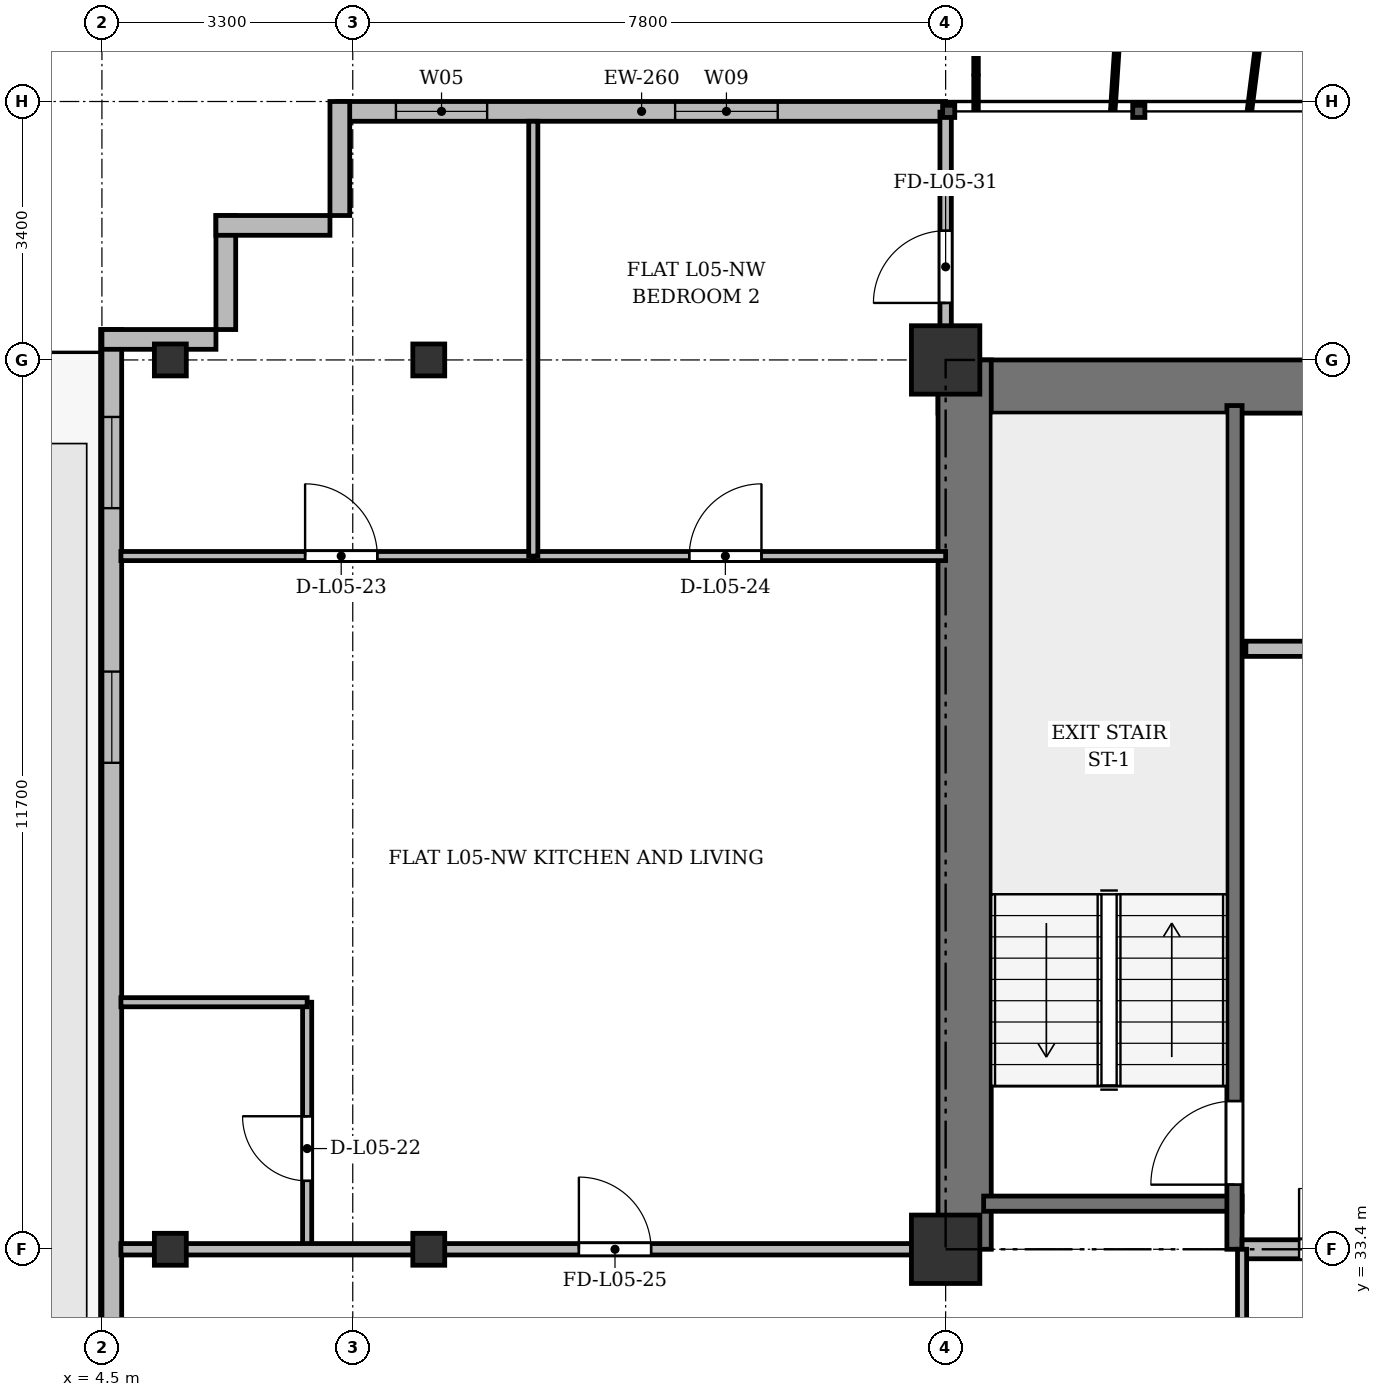
"""IFC4 building model, lengths in metres.
Left out: names, types, materials, properties, quantities, classifications, styles, units other than length and angle.
Written with IfcOpenShell. Run it as: python <this file> out.ifc"""

import sys

from ifc_helpers import new_model, si_unit, direction, frame, frame_2d, origin, origin_2d, place, context, subcontext, project, spatial, rectangle, i_section, extrude, source, transform, mapped, element, fill, save


model = new_model("IFC4")
c1 = context("Model", 3, precision=1e-05, world=origin(), true_north=direction((0.0, 1.0)))
c2 = subcontext(c1, "Body", "Model", "MODEL_VIEW")
j1 = project(units=[si_unit("LENGTHUNIT", "METRE"), si_unit("PLANEANGLEUNIT", "RADIAN")], contexts=[c1])
p1 = place(None, origin())
s1 = spatial("IfcSite", under=j1, at=p1, CompositionType="ELEMENT")
p2 = place(p1, origin())
s2 = spatial("IfcBuilding", under=s1, at=p2, CompositionType="ELEMENT")
p3 = place(p2, frame((0.0, 0.0, 23.5)))
s3 = spatial("IfcBuildingStorey", under=s2, at=p3, CompositionType="ELEMENT", Elevation=23.5)
m1 = source(origin(), c2, "Body", "SweptSolid", [
    extrude(i_section(OverallWidth=0.42, OverallDepth=0.42, WebThickness=0.026, FlangeThickness=0.04, at=origin_2d()), origin(), (0.0, 0.0, 1.0), 3.6),
])
for number, where, z_axis, x_axis in (
    (1, (5.4, 33.4, 0.0), (0.0, 0.0, 1.0), (1.0, 0.0, 0.0)),
    (2, (5.4, 45.1, 0.0), (0.0, 0.0, 1.0), (1.0, 0.0, 0.0)),
    (3, (8.8, 33.4, 0.0), (0.0, 0.0, 1.0), (1.0, 0.0, 0.0)),
    (4, (8.8, 45.1, 0.0), (0.0, 0.0, 1.0), (1.0, 0.0, 0.0)),
):
    element("IfcColumn", number, at=place(p3, frame(where, z_axis=z_axis, x_axis=x_axis)), inside=s3, PredefinedType="COLUMN", context=c2, shape_type="MappedRepresentation", body=[
        mapped(m1, transform((0.0, 0.0, 0.0), x_axis=(1.0, 0.0, 0.0), y_axis=(0.0, 1.0, 0.0), z_axis=(0.0, 0.0, 1.0), scale=1.0)),
    ])
m2 = source(origin(), c2, "Body", "SweptSolid", [
    extrude(rectangle(XDim=0.9, YDim=0.9, at=origin_2d()), origin(), (0.0, 0.0, 1.0), 3.6),
])
for number, where, z_axis, x_axis in (
    (5, (15.6, 33.4, 0.0), (0.0, 0.0, 1.0), (1.0, 0.0, 0.0)),
    (6, (15.6, 45.1, 0.0), (0.0, 0.0, 1.0), (1.0, 0.0, 0.0)),
):
    element("IfcColumn", number, at=place(p3, frame(where, z_axis=z_axis, x_axis=x_axis)), inside=s3, PredefinedType="COLUMN", context=c2, shape_type="MappedRepresentation", body=[
        mapped(m2, transform((0.0, 0.0, 0.0), x_axis=(1.0, 0.0, 0.0), y_axis=(0.0, 1.0, 0.0), z_axis=(0.0, 0.0, 1.0), scale=1.0)),
    ])
p4 = place(p3, frame((7.6, 48.37, 0.0), z_axis=(0.0, 0.0, 1.0), x_axis=(1.0, 0.0, 0.0)))
e7 = element("IfcWall", 7, at=p4, inside=s3, PredefinedType="SOLIDWALL", context=c2, shape_type="SweptSolid", body=[
    extrude(rectangle(XDim=8.0, YDim=0.26, at=frame_2d((4.0, 0.0))), origin(), (0.0, 0.0, 1.0), 3.34),
])
p5 = place(p4, frame((0.768, 0.0, 0.9)))
e8 = element("IfcOpeningElement", 8, at=p5, cuts=e7, PredefinedType="OPENING", context=c2, shape_type="SweptSolid", body=[
    extrude(rectangle(XDim=1.2, YDim=1.65, at=frame_2d((0.6, 0.825))), frame((0.0, 0.14, 0.0), z_axis=(0.0, -1.0, 0.0), x_axis=(1.0, 0.0, 0.0)), (0.0, 0.0, 1.0), 0.28),
])
p6 = place(p4, frame((4.441, 0.0, 0.9)))
e9 = element("IfcOpeningElement", 9, at=p6, cuts=e7, PredefinedType="OPENING", context=c2, shape_type="SweptSolid", body=[
    extrude(rectangle(XDim=1.35, YDim=1.5, at=frame_2d((0.675, 0.75))), frame((0.0, 0.14, 0.0), z_axis=(0.0, -1.0, 0.0), x_axis=(1.0, 0.0, 0.0)), (0.0, 0.0, 1.0), 0.28),
])
p7 = place(p3, frame((4.63, 5.9, 0.0), z_axis=(0.0, 0.0, 1.0), x_axis=(0.0, 1.0, 0.0)))
e10 = element("IfcWall", 10, at=p7, inside=s3, PredefinedType="SOLIDWALL", context=c2, shape_type="SweptSolid", body=[
    extrude(rectangle(XDim=39.6, YDim=0.26, at=frame_2d((19.8, 0.0))), origin(), (0.0, 0.0, 1.0), 3.34),
])
p8 = place(p7, frame((9.745, 0.0, 0.0)))
e11 = element("IfcOpeningElement", 11, at=p8, cuts=e10, PredefinedType="OPENING", context=c2, shape_type="SweptSolid", body=[
    extrude(rectangle(XDim=1.2, YDim=2.2, at=frame_2d((0.6, 1.1))), frame((0.0, 0.14, 0.0), z_axis=(0.0, -1.0, 0.0), x_axis=(1.0, 0.0, 0.0)), (0.0, 0.0, 1.0), 0.28),
])
p9 = place(p7, frame((1.45, 0.0, 0.92)))
e12 = element("IfcOpeningElement", 12, at=p9, cuts=e10, PredefinedType="OPENING", context=c2, shape_type="SweptSolid", body=[
    extrude(rectangle(XDim=1.2, YDim=1.65, at=frame_2d((0.6, 0.825))), frame((0.0, 0.14, 0.0), z_axis=(0.0, -1.0, 0.0), x_axis=(1.0, 0.0, 0.0)), (0.0, 0.0, 1.0), 0.28),
])
p10 = place(p7, frame((4.3, 0.0, 0.92)))
e13 = element("IfcOpeningElement", 13, at=p10, cuts=e10, PredefinedType="OPENING", context=c2, shape_type="SweptSolid", body=[
    extrude(rectangle(XDim=2.4, YDim=2.1, at=frame_2d((1.2, 1.05))), frame((0.0, 0.14, 0.0), z_axis=(0.0, -1.0, 0.0), x_axis=(1.0, 0.0, 0.0)), (0.0, 0.0, 1.0), 0.28),
])
p11 = place(p7, frame((33.9, 0.0, 0.92)))
e14 = element("IfcOpeningElement", 14, at=p11, cuts=e10, PredefinedType="OPENING", context=c2, shape_type="SweptSolid", body=[
    extrude(rectangle(XDim=1.2, YDim=1.65, at=frame_2d((0.6, 0.825))), frame((0.0, 0.14, 0.0), z_axis=(0.0, -1.0, 0.0), x_axis=(1.0, 0.0, 0.0)), (0.0, 0.0, 1.0), 0.28),
])
p12 = place(p7, frame((37.25, 0.0, 0.92)))
e15 = element("IfcOpeningElement", 15, at=p12, cuts=e10, PredefinedType="OPENING", context=c2, shape_type="SweptSolid", body=[
    extrude(rectangle(XDim=1.2, YDim=1.65, at=frame_2d((0.6, 0.825))), frame((0.0, 0.14, 0.0), z_axis=(0.0, -1.0, 0.0), x_axis=(1.0, 0.0, 0.0)), (0.0, 0.0, 1.0), 0.28),
])
p13 = place(p3, frame((4.5, 45.37, 0.0), z_axis=(0.0, 0.0, 1.0), x_axis=(1.0, 0.0, 0.0)))
e16 = element("IfcWall", 16, at=p13, inside=s3, PredefinedType="SOLIDWALL", context=c2, shape_type="SweptSolid", body=[
    extrude(rectangle(XDim=1.5, YDim=0.26, at=frame_2d((0.75, 0.0))), origin(), (0.0, 0.0, 1.0), 2.69),
])
for number, where, z_axis, x_axis in (
    (17, (6.13, 45.5, 0.0), (0.0, 0.0, 1.0), (0.0, 1.0, 0.0)),
    (18, (6.0, 46.87, 0.0), (0.0, 0.0, 1.0), (1.0, 0.0, 0.0)),
    (19, (7.63, 47.0, 0.0), (0.0, 0.0, 1.0), (0.0, 1.0, 0.0)),
):
    element("IfcWall", number, at=place(p3, frame(where, z_axis=z_axis, x_axis=x_axis)), inside=s3, PredefinedType="SOLIDWALL", context=c2, shape_type="SweptSolid", body=[
        extrude(rectangle(XDim=1.5, YDim=0.26, at=frame_2d((0.75, 0.0))), origin(), (0.0, 0.0, 1.0), 3.34),
    ])
p14 = place(p3, frame((15.5, 44.75, 0.0), z_axis=(0.0, 0.0, 1.0), x_axis=(1.0, 0.0, 0.0)))
e20 = element("IfcWall", 20, at=p14, inside=s3, PredefinedType="SHEAR", context=c2, shape_type="SweptSolid", body=[
    extrude(rectangle(XDim=43.4, YDim=0.7, at=frame_2d((21.7, 0.0))), origin(), (0.0, 0.0, 1.0), 3.34),
])
p15 = place(p3, frame((15.85, 33.4, 0.0), z_axis=(0.0, 0.0, 1.0), x_axis=(0.0, 1.0, 0.0)))
e21 = element("IfcWall", 21, at=p15, inside=s3, PredefinedType="SHEAR", context=c2, shape_type="SweptSolid", body=[
    extrude(rectangle(XDim=11.7, YDim=0.7, at=frame_2d((5.85, 0.0))), origin(), (0.0, 0.0, 1.0), 3.34),
])
p16 = place(p3, frame((16.1, 34.0, 0.0), z_axis=(0.0, 0.0, 1.0), x_axis=(1.0, 0.0, 0.0)))
e22 = element("IfcWall", 22, at=p16, inside=s3, PredefinedType="SHEAR", context=c2, shape_type="SweptSolid", body=[
    extrude(rectangle(XDim=3.4, YDim=0.2, at=frame_2d((1.7, 0.0))), origin(), (0.0, 0.0, 1.0), 3.34),
])
p17 = place(p3, frame((19.4, 33.4, 0.0), z_axis=(0.0, 0.0, 1.0), x_axis=(0.0, 1.0, 0.0)))
e23 = element("IfcWall", 23, at=p17, inside=s3, PredefinedType="SHEAR", context=c2, shape_type="SweptSolid", body=[
    extrude(rectangle(XDim=11.1, YDim=0.2, at=frame_2d((5.55, 0.0))), origin(), (0.0, 0.0, 1.0), 3.34),
])
p18 = place(p17, frame((0.85, 0.0, 0.0)))
e24 = element("IfcOpeningElement", 24, at=p18, cuts=e23, PredefinedType="OPENING", context=c2, shape_type="SweptSolid", body=[
    extrude(rectangle(XDim=1.1, YDim=2.15, at=frame_2d((0.55, 1.075))), frame((0.0, 0.11, 0.0), z_axis=(0.0, -1.0, 0.0), x_axis=(1.0, 0.0, 0.0)), (0.0, 0.0, 1.0), 0.22),
])
p19 = place(p3, frame((19.55, 41.3, 0.0), z_axis=(0.0, 0.0, 1.0), x_axis=(1.0, 0.0, 0.0)))
e25 = element("IfcWall", 25, at=p19, inside=s3, PredefinedType="SOLIDWALL", context=c2, shape_type="SweptSolid", body=[
    extrude(rectangle(XDim=6.75, YDim=0.2, at=frame_2d((3.375, 0.0))), origin(), (0.0, 0.0, 1.0), 3.34),
])
p20 = place(p19, frame((1.7, 0.0, 0.0)))
e26 = element("IfcOpeningElement", 26, at=p20, cuts=e25, PredefinedType="OPENING", context=c2, shape_type="SweptSolid", body=[
    extrude(rectangle(XDim=1.1, YDim=2.15, at=frame_2d((0.55, 1.075))), frame((0.0, 0.11, 0.0), z_axis=(0.0, -1.0, 0.0), x_axis=(1.0, 0.0, 0.0)), (0.0, 0.0, 1.0), 0.22),
])
p21 = place(p19, frame((4.4, 0.0, 0.0)))
e27 = element("IfcOpeningElement", 27, at=p21, cuts=e25, PredefinedType="OPENING", context=c2, shape_type="SweptSolid", body=[
    extrude(rectangle(XDim=1.1, YDim=2.15, at=frame_2d((0.55, 1.075))), frame((0.0, 0.11, 0.0), z_axis=(0.0, -1.0, 0.0), x_axis=(1.0, 0.0, 0.0)), (0.0, 0.0, 1.0), 0.22),
])
p22 = place(p3, frame((19.5, 33.4, 0.0), z_axis=(0.0, 0.0, 1.0), x_axis=(1.0, 0.0, 0.0)))
e28 = element("IfcWall", 28, at=p22, inside=s3, PredefinedType="PARTITIONING", context=c2, shape_type="SweptSolid", body=[
    extrude(rectangle(XDim=6.8, YDim=0.25, at=frame_2d((3.4, 0.0))), origin(), (0.0, 0.0, 1.0), 2.69),
])
p23 = place(p22, frame((0.75, 0.0, 0.0)))
e29 = element("IfcOpeningElement", 29, at=p23, cuts=e28, PredefinedType="OPENING", context=c2, shape_type="SweptSolid", body=[
    extrude(rectangle(XDim=1.6, YDim=2.2, at=frame_2d((0.8, 1.1))), frame((0.0, 0.135, 0.0), z_axis=(0.0, -1.0, 0.0), x_axis=(1.0, 0.0, 0.0)), (0.0, 0.0, 1.0), 0.27),
])
p24 = place(p3, frame((19.5, 29.8, 0.0), z_axis=(0.0, 0.0, 1.0), x_axis=(0.0, 1.0, 0.0)))
e30 = element("IfcWall", 30, at=p24, inside=s3, PredefinedType="PARTITIONING", context=c2, shape_type="SweptSolid", body=[
    extrude(rectangle(XDim=3.6, YDim=0.12, at=frame_2d((1.8, 0.0))), origin(), (0.0, 0.0, 1.0), 2.69),
])
p25 = place(p3, frame((7.2, 33.4, 0.0), z_axis=(0.0, 0.0, 1.0), x_axis=(0.0, 1.0, 0.0)))
e31 = element("IfcWall", 31, at=p25, inside=s3, PredefinedType="PARTITIONING", context=c2, shape_type="SweptSolid", body=[
    extrude(rectangle(XDim=3.25, YDim=0.12, at=frame_2d((1.625, 0.0))), origin(), (0.0, 0.0, 1.0), 2.69),
])
p26 = place(p25, frame((0.9, 0.0, 0.0)))
e32 = element("IfcOpeningElement", 32, at=p26, cuts=e31, PredefinedType="OPENING", context=c2, shape_type="SweptSolid", body=[
    extrude(rectangle(XDim=0.85, YDim=2.1, at=frame_2d((0.425, 1.05))), frame((0.0, 0.07, 0.0), z_axis=(0.0, -1.0, 0.0), x_axis=(1.0, 0.0, 0.0)), (0.0, 0.0, 1.0), 0.14),
])
p27 = place(p3, frame((4.75, 36.65, 0.0), z_axis=(0.0, 0.0, 1.0), x_axis=(1.0, 0.0, 0.0)))
e33 = element("IfcWall", 33, at=p27, inside=s3, PredefinedType="PARTITIONING", context=c2, shape_type="SweptSolid", body=[
    extrude(rectangle(XDim=2.45, YDim=0.12, at=frame_2d((1.225, 0.0))), origin(), (0.0, 0.0, 1.0), 2.752),
])
p28 = place(p3, frame((4.75, 42.52, 0.0), z_axis=(0.0, 0.0, 1.0), x_axis=(1.0, 0.0, 0.0)))
e34 = element("IfcWall", 34, at=p28, inside=s3, PredefinedType="PARTITIONING", context=c2, shape_type="SweptSolid", body=[
    extrude(rectangle(XDim=5.425, YDim=0.12, at=frame_2d((2.712, 0.0))), origin(), (0.0, 0.0, 1.0), 2.752),
])
p29 = place(p28, frame((2.423, 0.0, 0.0)))
e35 = element("IfcOpeningElement", 35, at=p29, cuts=e34, PredefinedType="OPENING", context=c2, shape_type="SweptSolid", body=[
    extrude(rectangle(XDim=0.95, YDim=2.15, at=frame_2d((0.475, 1.075))), frame((0.0, 0.07, 0.0), z_axis=(0.0, -1.0, 0.0), x_axis=(1.0, 0.0, 0.0)), (0.0, 0.0, 1.0), 0.14),
])
p30 = place(p3, frame((10.175, 42.52, 0.0), z_axis=(0.0, 0.0, 1.0), x_axis=(1.0, 0.0, 0.0)))
e36 = element("IfcWall", 36, at=p30, inside=s3, PredefinedType="PARTITIONING", context=c2, shape_type="SweptSolid", body=[
    extrude(rectangle(XDim=5.425, YDim=0.12, at=frame_2d((2.712, 0.0))), origin(), (0.0, 0.0, 1.0), 2.752),
])
p31 = place(p30, frame((2.052, 0.0, 0.0)))
e37 = element("IfcOpeningElement", 37, at=p31, cuts=e36, PredefinedType="OPENING", context=c2, shape_type="SweptSolid", body=[
    extrude(rectangle(XDim=0.95, YDim=2.15, at=frame_2d((0.475, 1.075))), frame((0.0, 0.07, 0.0), z_axis=(0.0, -1.0, 0.0), x_axis=(1.0, 0.0, 0.0)), (0.0, 0.0, 1.0), 0.14),
])
p32 = place(p3, frame((10.175, 42.52, 0.0), z_axis=(0.0, 0.0, 1.0), x_axis=(0.0, 1.0, 0.0)))
e38 = element("IfcWall", 38, at=p32, inside=s3, PredefinedType="PARTITIONING", context=c2, shape_type="SweptSolid", body=[
    extrude(rectangle(XDim=5.72, YDim=0.12, at=frame_2d((2.86, 0.0))), origin(), (0.0, 0.0, 1.0), 2.69),
])
p33 = place(p3, frame((4.75, 33.4, 0.0), z_axis=(0.0, 0.0, 1.0), x_axis=(1.0, 0.0, 0.0)))
e39 = element("IfcWall", 39, at=p33, inside=s3, PredefinedType="PARTITIONING", context=c2, shape_type="SweptSolid", body=[
    extrude(rectangle(XDim=10.85, YDim=0.15, at=frame_2d((5.425, 0.0))), origin(), (0.0, 0.0, 1.0), 2.69),
])
p34 = place(p33, frame((6.025, 0.0, 0.0)))
e40 = element("IfcOpeningElement", 40, at=p34, cuts=e39, PredefinedType="OPENING", context=c2, shape_type="SweptSolid", body=[
    extrude(rectangle(XDim=0.95, YDim=2.15, at=frame_2d((0.475, 1.075))), frame((0.0, 0.085, 0.0), z_axis=(0.0, -1.0, 0.0), x_axis=(1.0, 0.0, 0.0)), (0.0, 0.0, 1.0), 0.17),
])
p35 = place(p3, frame((15.6, 44.75, 0.0), z_axis=(0.0, 0.0, 1.0), x_axis=(0.0, 1.0, 0.0)))
e41 = element("IfcWall", 41, at=p35, inside=s3, PredefinedType="PARTITIONING", context=c2, shape_type="SweptSolid", body=[
    extrude(rectangle(XDim=3.61, YDim=0.15, at=frame_2d((1.805, 0.0))), origin(), (0.0, 0.0, 1.0), 2.752),
])
p36 = place(p35, frame((1.1, 0.0, 0.0)))
e42 = element("IfcOpeningElement", 42, at=p36, cuts=e41, PredefinedType="OPENING", context=c2, shape_type="SweptSolid", body=[
    extrude(rectangle(XDim=0.95, YDim=2.15, at=frame_2d((0.475, 1.075))), frame((0.0, 0.085, 0.0), z_axis=(0.0, -1.0, 0.0), x_axis=(1.0, 0.0, 0.0)), (0.0, 0.0, 1.0), 0.17),
])
m3 = source(origin(), c2, "Body", "SweptSolid", [
    extrude(rectangle(XDim=1.2, YDim=1.65, at=frame_2d((0.6, 0.825))), frame((0.0, 0.03, 0.0), z_axis=(0.0, -1.0, 0.0), x_axis=(1.0, 0.0, 0.0)), (0.0, 0.0, 1.0), 0.06),
])
p37 = place(p5, origin())
e43 = element("IfcWindow", 43, at=p37, inside=s3, PartitioningType="SINGLE_PANEL", PredefinedType="WINDOW", context=c2, shape_type="MappedRepresentation", body=[
    mapped(m3, transform((0.0, 0.0, 0.0), x_axis=(1.0, 0.0, 0.0), y_axis=(0.0, 1.0, 0.0), z_axis=(0.0, 0.0, 1.0), scale=1.0)),
])
fill(e8, e43)
m4 = source(origin(), c2, "Body", "SweptSolid", [
    extrude(rectangle(XDim=1.35, YDim=1.5, at=frame_2d((0.675, 0.75))), frame((0.0, 0.03, 0.0), z_axis=(0.0, -1.0, 0.0), x_axis=(1.0, 0.0, 0.0)), (0.0, 0.0, 1.0), 0.06),
])
p38 = place(p6, origin())
e44 = element("IfcWindow", 44, at=p38, inside=s3, PartitioningType="SINGLE_PANEL", PredefinedType="WINDOW", context=c2, shape_type="MappedRepresentation", body=[
    mapped(m4, transform((0.0, 0.0, 0.0), x_axis=(1.0, 0.0, 0.0), y_axis=(0.0, 1.0, 0.0), z_axis=(0.0, 0.0, 1.0), scale=1.0)),
])
fill(e9, e44)
p39 = place(p11, origin())
e45 = element("IfcWindow", 45, at=p39, inside=s3, PartitioningType="SINGLE_PANEL", PredefinedType="WINDOW", context=c2, shape_type="MappedRepresentation", body=[
    mapped(m3, transform((0.0, 0.0, 0.0), x_axis=(1.0, 0.0, 0.0), y_axis=(0.0, 1.0, 0.0), z_axis=(0.0, 0.0, 1.0), scale=1.0)),
])
fill(e14, e45)
p40 = place(p12, origin())
e46 = element("IfcWindow", 46, at=p40, inside=s3, PartitioningType="SINGLE_PANEL", PredefinedType="WINDOW", context=c2, shape_type="MappedRepresentation", body=[
    mapped(m3, transform((0.0, 0.0, 0.0), x_axis=(1.0, 0.0, 0.0), y_axis=(0.0, 1.0, 0.0), z_axis=(0.0, 0.0, 1.0), scale=1.0)),
])
fill(e15, e46)
m5 = source(origin(), c2, "Body", "SweptSolid", [
    extrude(rectangle(XDim=1.1, YDim=2.15, at=frame_2d((0.55, 1.075))), frame((0.0, 0.025, 0.0), z_axis=(0.0, -1.0, 0.0), x_axis=(1.0, 0.0, 0.0)), (0.0, 0.0, 1.0), 0.05),
])
p41 = place(p18, origin())
e47 = element("IfcDoor", 47, at=p41, inside=s3, OperationType="SINGLE_SWING_LEFT", PredefinedType="DOOR", context=c2, shape_type="MappedRepresentation", body=[
    mapped(m5, transform((0.0, 0.0, 0.0), x_axis=(1.0, 0.0, 0.0), y_axis=(0.0, 1.0, 0.0), z_axis=(0.0, 0.0, 1.0), scale=1.0)),
])
fill(e24, e47)
m6 = source(origin(), c2, "Body", "SweptSolid", [
    extrude(rectangle(XDim=1.6, YDim=2.2, at=frame_2d((0.8, 1.1))), frame((0.0, 0.025, 0.0), z_axis=(0.0, -1.0, 0.0), x_axis=(1.0, 0.0, 0.0)), (0.0, 0.0, 1.0), 0.05),
])
p42 = place(p23, origin())
e48 = element("IfcDoor", 48, at=p42, inside=s3, OperationType="DOUBLE_DOOR_SINGLE_SWING", PredefinedType="DOOR", context=c2, shape_type="MappedRepresentation", body=[
    mapped(m6, transform((0.0, 0.0, 0.0), x_axis=(1.0, 0.0, 0.0), y_axis=(0.0, 1.0, 0.0), z_axis=(0.0, 0.0, 1.0), scale=1.0)),
])
fill(e29, e48)
m7 = source(origin(), c2, "Body", "SweptSolid", [
    extrude(rectangle(XDim=0.85, YDim=2.1, at=frame_2d((0.425, 1.05))), frame((0.0, 0.025, 0.0), z_axis=(0.0, -1.0, 0.0), x_axis=(1.0, 0.0, 0.0)), (0.0, 0.0, 1.0), 0.05),
])
p43 = place(p26, origin())
e49 = element("IfcDoor", 49, at=p43, inside=s3, OperationType="SINGLE_SWING_RIGHT", PredefinedType="DOOR", context=c2, shape_type="MappedRepresentation", body=[
    mapped(m7, transform((0.0, 0.0, 0.0), x_axis=(1.0, 0.0, 0.0), y_axis=(0.0, 1.0, 0.0), z_axis=(0.0, 0.0, 1.0), scale=1.0)),
])
fill(e32, e49)
m8 = source(origin(), c2, "Body", "SweptSolid", [
    extrude(rectangle(XDim=0.95, YDim=2.15, at=frame_2d((0.475, 1.075))), frame((0.0, 0.025, 0.0), z_axis=(0.0, -1.0, 0.0), x_axis=(1.0, 0.0, 0.0)), (0.0, 0.0, 1.0), 0.05),
])
p44 = place(p29, origin())
e50 = element("IfcDoor", 50, at=p44, inside=s3, OperationType="SINGLE_SWING_LEFT", PredefinedType="DOOR", context=c2, shape_type="MappedRepresentation", body=[
    mapped(m8, transform((0.0, 0.0, 0.0), x_axis=(1.0, 0.0, 0.0), y_axis=(0.0, 1.0, 0.0), z_axis=(0.0, 0.0, 1.0), scale=1.0)),
])
fill(e35, e50)
p45 = place(p31, origin())
e51 = element("IfcDoor", 51, at=p45, inside=s3, OperationType="SINGLE_SWING_RIGHT", PredefinedType="DOOR", context=c2, shape_type="MappedRepresentation", body=[
    mapped(m8, transform((0.0, 0.0, 0.0), x_axis=(1.0, 0.0, 0.0), y_axis=(0.0, 1.0, 0.0), z_axis=(0.0, 0.0, 1.0), scale=1.0)),
])
fill(e37, e51)
p46 = place(p34, origin())
e52 = element("IfcDoor", 52, at=p46, inside=s3, OperationType="SINGLE_SWING_LEFT", PredefinedType="DOOR", context=c2, shape_type="MappedRepresentation", body=[
    mapped(m8, transform((0.0, 0.0, 0.0), x_axis=(1.0, 0.0, 0.0), y_axis=(0.0, 1.0, 0.0), z_axis=(0.0, 0.0, 1.0), scale=1.0)),
])
fill(e40, e52)
p47 = place(p36, origin())
e53 = element("IfcDoor", 53, at=p47, inside=s3, OperationType="SINGLE_SWING_LEFT", PredefinedType="DOOR", context=c2, shape_type="MappedRepresentation", body=[
    mapped(m8, transform((0.0, 0.0, 0.0), x_axis=(1.0, 0.0, 0.0), y_axis=(0.0, 1.0, 0.0), z_axis=(0.0, 0.0, 1.0), scale=1.0)),
])
fill(e42, e53)
save(model, sys.argv[1])
